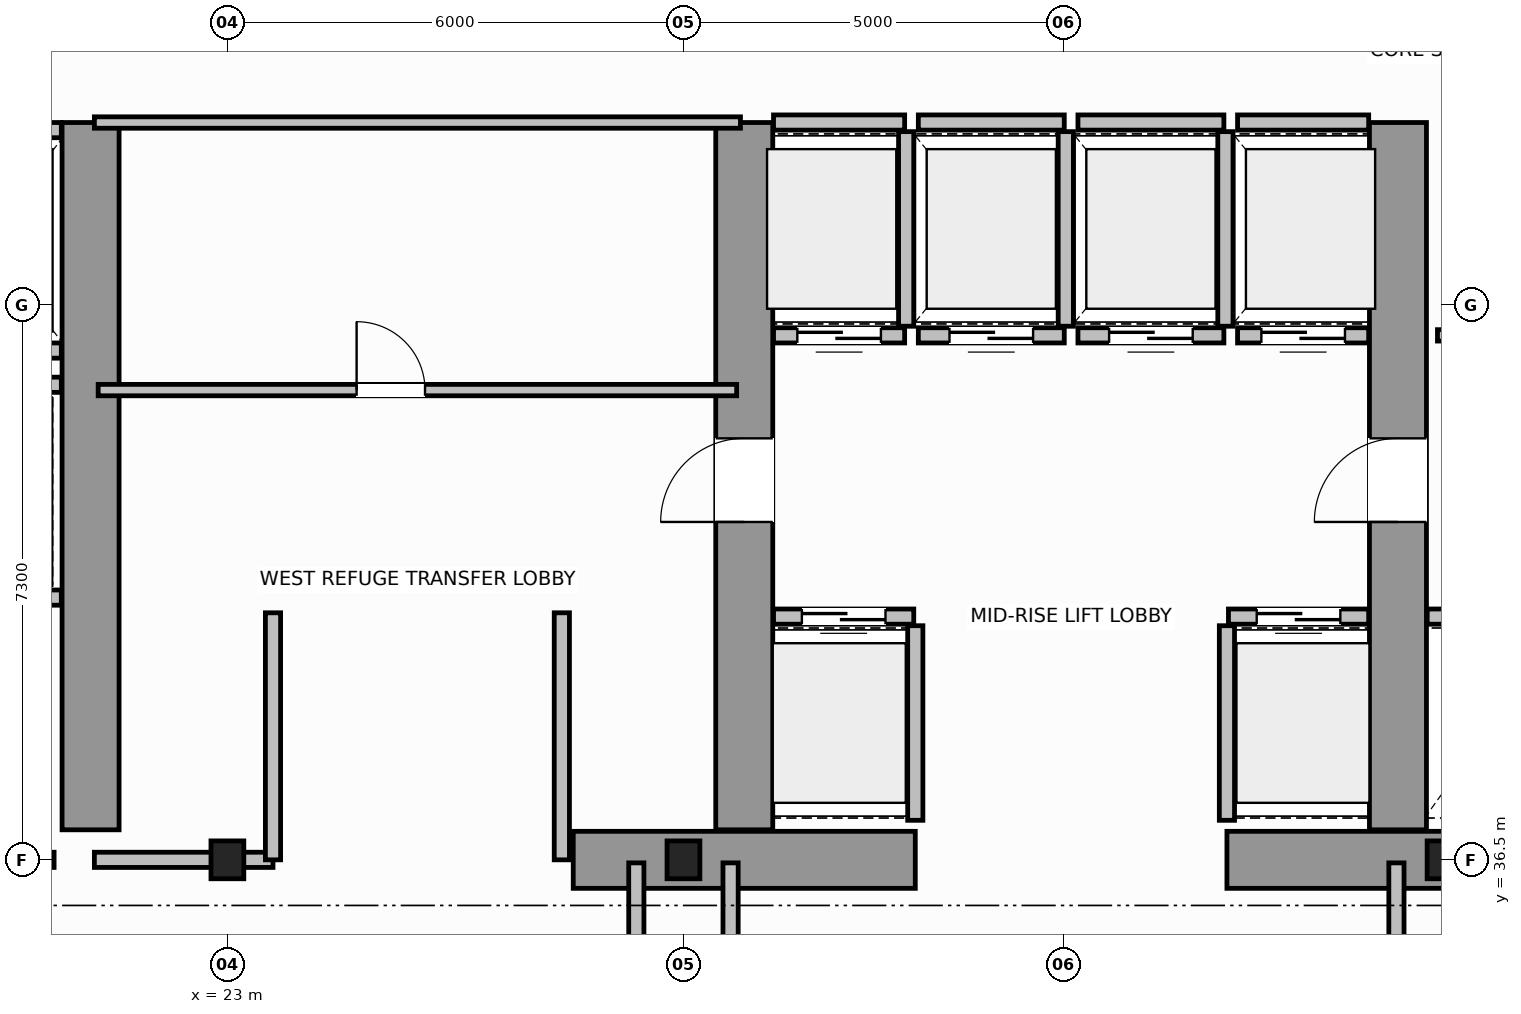
"""IFC4 building model, lengths in metres.
Left out: names, types, materials, properties, quantities, classifications, styles, units other than length and angle.
Written with IfcOpenShell. Run it as: python <this file> out.ifc"""

import sys

from ifc_helpers import new_model, si_unit, direction, frame, frame_2d, origin, origin_2d, place, context, subcontext, project, spatial, rectangle, i_section, extrude, source, transform, mapped, element, fill, save


model = new_model("IFC4")
c1 = context("Model", 3, precision=1e-05, world=origin(), true_north=direction((0.0, 1.0)))
c2 = subcontext(c1, "Body", "Model", "MODEL_VIEW")
j1 = project(units=[si_unit("LENGTHUNIT", "METRE"), si_unit("PLANEANGLEUNIT", "RADIAN")], contexts=[c1])
p1 = place(None, origin())
s1 = spatial("IfcSite", under=j1, at=p1, CompositionType="ELEMENT")
p2 = place(p1, origin())
s2 = spatial("IfcBuilding", under=s1, at=p2, CompositionType="ELEMENT")
p3 = place(p2, frame((0.0, 0.0, 149.0)))
s3 = spatial("IfcBuildingStorey", under=s2, at=p3, CompositionType="ELEMENT", Elevation=149.0)
m1 = source(origin(), c2, "Body", "SweptSolid", [
    extrude(i_section(OverallWidth=0.432, OverallDepth=0.498, WebThickness=0.055, FlangeThickness=0.068, FilletRadius=0.015, at=origin_2d()), origin(), (0.0, 0.0, 1.0), 4.8),
])
for number, where, z_axis, x_axis in (
    (1, (23.0, 36.5, 0.0), (0.0, 0.0, 1.0), (1.0, 0.0, 0.0)),
    (2, (29.0, 36.5, 0.0), (0.0, 0.0, 1.0), (1.0, 0.0, 0.0)),
    (3, (39.0, 36.5, 0.0), (0.0, 0.0, 1.0), (1.0, 0.0, 0.0)),
):
    element("IfcColumn", number, at=place(p3, frame(where, z_axis=z_axis, x_axis=x_axis)), inside=s3, PredefinedType="COLUMN", context=c2, shape_type="MappedRepresentation", body=[
        mapped(m1, transform((0.0, 0.0, 0.0), scale=1.0)),
    ])
for number, where, z_axis, x_axis in (
    (4, (27.55, 36.5, 0.0), (0.0, 0.0, 1.0), (1.0, 0.0, 0.0)),
    (5, (36.15, 36.5, 0.0), (0.0, 0.0, 1.0), (1.0, 0.0, 0.0)),
):
    element("IfcWall", number, at=place(p3, frame(where, z_axis=z_axis, x_axis=x_axis)), inside=s3, PredefinedType="SHEAR", context=c2, shape_type="SweptSolid", body=[
        extrude(rectangle(XDim=4.5, YDim=0.75, at=frame_2d((2.25, 0.0))), origin(), (0.0, 0.0, 1.0), 4.8),
    ])
p4 = place(p3, frame((21.2, 36.895, 0.0), z_axis=(0.0, 0.0, 1.0), x_axis=(0.0, 1.0, 0.0)))
e6 = element("IfcWall", 6, at=p4, inside=s3, PredefinedType="SHEAR", context=c2, shape_type="SweptSolid", body=[
    extrude(rectangle(XDim=9.305, YDim=0.75, at=frame_2d((4.652, 0.0))), origin(), (0.0, 0.0, 1.0), 4.8),
])
p5 = place(p3, frame((29.8, 36.895, 0.0), z_axis=(0.0, 0.0, 1.0), x_axis=(0.0, 1.0, 0.0)))
e7 = element("IfcWall", 7, at=p5, inside=s3, PredefinedType="SHEAR", context=c2, shape_type="SweptSolid", body=[
    extrude(rectangle(XDim=9.305, YDim=0.75, at=frame_2d((4.652, 0.0))), origin(), (0.0, 0.0, 1.0), 4.8),
])
p6 = place(p5, frame((4.05, 0.0, 0.0)))
e8 = element("IfcOpeningElement", 8, at=p6, cuts=e7, PredefinedType="OPENING", context=c2, shape_type="SweptSolid", body=[
    extrude(rectangle(XDim=1.1, YDim=2.15, at=frame_2d((0.55, 1.075))), frame((0.0, 0.385, 0.0), z_axis=(0.0, -1.0, 0.0), x_axis=(1.0, 0.0, 0.0)), (0.0, 0.0, 1.0), 0.77),
])
p7 = place(p3, frame((38.4, 36.895, 0.0), z_axis=(0.0, 0.0, 1.0), x_axis=(0.0, 1.0, 0.0)))
e9 = element("IfcWall", 9, at=p7, inside=s3, PredefinedType="SHEAR", context=c2, shape_type="SweptSolid", body=[
    extrude(rectangle(XDim=9.305, YDim=0.75, at=frame_2d((4.652, 0.0))), origin(), (0.0, 0.0, 1.0), 4.8),
])
p8 = place(p7, frame((4.05, 0.0, 0.0)))
e10 = element("IfcOpeningElement", 10, at=p8, cuts=e9, PredefinedType="OPENING", context=c2, shape_type="SweptSolid", body=[
    extrude(rectangle(XDim=1.1, YDim=2.15, at=frame_2d((0.55, 1.075))), frame((0.0, 0.385, 0.0), z_axis=(0.0, -1.0, 0.0), x_axis=(1.0, 0.0, 0.0)), (0.0, 0.0, 1.0), 0.77),
])
p9 = place(p3, frame((18.25, 36.5, 0.0), z_axis=(0.0, 0.0, 1.0), x_axis=(1.0, 0.0, 0.0)))
e11 = element("IfcWall", 11, at=p9, inside=s3, PredefinedType="SOLIDWALL", context=c2, shape_type="SweptSolid", body=[
    extrude(rectangle(XDim=2.47, YDim=0.2, at=frame_2d((1.235, 0.0))), origin(), (0.0, 0.0, 1.0), 3.33),
])
p10 = place(p9, frame((0.65, 0.0, 0.0)))
e12 = element("IfcOpeningElement", 12, at=p10, cuts=e11, PredefinedType="OPENING", context=c2, shape_type="SweptSolid", body=[
    extrude(rectangle(XDim=1.1, YDim=2.15, at=frame_2d((0.55, 1.075))), frame((0.0, 0.11, 0.0), z_axis=(0.0, -1.0, 0.0), x_axis=(1.0, 0.0, 0.0)), (0.0, 0.0, 1.0), 0.22),
])
p11 = place(p3, frame((30.185, 39.7, 0.0), z_axis=(0.0, 0.0, 1.0), x_axis=(1.0, 0.0, 0.0)))
e13 = element("IfcWall", 13, at=p11, inside=s3, PredefinedType="SOLIDWALL", context=c2, shape_type="SweptSolid", body=[
    extrude(rectangle(XDim=1.845, YDim=0.2, at=frame_2d((0.922, 0.0))), origin(), (0.0, 0.0, 1.0), 4.54),
])
p12 = place(p11, frame((0.373, 0.0, 0.0)))
e14 = element("IfcOpeningElement", 14, at=p12, cuts=e13, PredefinedType="OPENING", context=c2, shape_type="SweptSolid", body=[
    extrude(rectangle(XDim=1.1, YDim=2.15, at=frame_2d((0.55, 1.075))), frame((0.0, 0.11, 0.0), z_axis=(0.0, -1.0, 0.0), x_axis=(1.0, 0.0, 0.0)), (0.0, 0.0, 1.0), 0.22),
])
p13 = place(p3, frame((32.05, 37.02, 0.0), z_axis=(0.0, 0.0, 1.0), x_axis=(0.0, 1.0, 0.0)))
e15 = element("IfcWall", 15, at=p13, inside=s3, PredefinedType="SOLIDWALL", context=c2, shape_type="SweptSolid", body=[
    extrude(rectangle(XDim=2.56, YDim=0.2, at=frame_2d((1.28, 0.0))), origin(), (0.0, 0.0, 1.0), 4.54),
])
p14 = place(p3, frame((36.17, 39.7, 0.0), z_axis=(0.0, 0.0, 1.0), x_axis=(1.0, 0.0, 0.0)))
e16 = element("IfcWall", 16, at=p14, inside=s3, PredefinedType="SOLIDWALL", context=c2, shape_type="SweptSolid", body=[
    extrude(rectangle(XDim=1.845, YDim=0.2, at=frame_2d((0.922, 0.0))), origin(), (0.0, 0.0, 1.0), 4.54),
])
p15 = place(p14, frame((0.372, 0.0, 0.0)))
e17 = element("IfcOpeningElement", 17, at=p15, cuts=e16, PredefinedType="OPENING", context=c2, shape_type="SweptSolid", body=[
    extrude(rectangle(XDim=1.1, YDim=2.15, at=frame_2d((0.55, 1.075))), frame((0.0, 0.11, 0.0), z_axis=(0.0, -1.0, 0.0), x_axis=(1.0, 0.0, 0.0)), (0.0, 0.0, 1.0), 0.22),
])
p16 = place(p3, frame((36.15, 37.02, 0.0), z_axis=(0.0, 0.0, 1.0), x_axis=(0.0, 1.0, 0.0)))
e18 = element("IfcWall", 18, at=p16, inside=s3, PredefinedType="SOLIDWALL", context=c2, shape_type="SweptSolid", body=[
    extrude(rectangle(XDim=2.56, YDim=0.2, at=frame_2d((1.28, 0.0))), origin(), (0.0, 0.0, 1.0), 4.54),
])
p17 = place(p3, frame((30.185, 43.4, 0.0), z_axis=(0.0, 0.0, 1.0), x_axis=(1.0, 0.0, 0.0)))
e19 = element("IfcWall", 19, at=p17, inside=s3, PredefinedType="SOLIDWALL", context=c2, shape_type="SweptSolid", body=[
    extrude(rectangle(XDim=1.725, YDim=0.2, at=frame_2d((0.862, 0.0))), origin(), (0.0, 0.0, 1.0), 4.54),
])
p18 = place(p17, frame((0.313, 0.0, 0.0)))
e20 = element("IfcOpeningElement", 20, at=p18, cuts=e19, PredefinedType="OPENING", context=c2, shape_type="SweptSolid", body=[
    extrude(rectangle(XDim=1.1, YDim=2.15, at=frame_2d((0.55, 1.075))), frame((0.0, 0.11, 0.0), z_axis=(0.0, -1.0, 0.0), x_axis=(1.0, 0.0, 0.0)), (0.0, 0.0, 1.0), 0.22),
])
p19 = place(p3, frame((30.185, 46.2, 0.0), z_axis=(0.0, 0.0, 1.0), x_axis=(1.0, 0.0, 0.0)))
e21 = element("IfcWall", 21, at=p19, inside=s3, PredefinedType="SOLIDWALL", context=c2, shape_type="SweptSolid", body=[
    extrude(rectangle(XDim=1.725, YDim=0.2, at=frame_2d((0.862, 0.0))), origin(), (0.0, 0.0, 1.0), 4.54),
])
p20 = place(p3, frame((31.93, 43.52, 0.0), z_axis=(0.0, 0.0, 1.0), x_axis=(0.0, 1.0, 0.0)))
e22 = element("IfcWall", 22, at=p20, inside=s3, PredefinedType="SOLIDWALL", context=c2, shape_type="SweptSolid", body=[
    extrude(rectangle(XDim=2.56, YDim=0.2, at=frame_2d((1.28, 0.0))), origin(), (0.0, 0.0, 1.0), 4.54),
])
p21 = place(p3, frame((32.09, 43.4, 0.0), z_axis=(0.0, 0.0, 1.0), x_axis=(1.0, 0.0, 0.0)))
e23 = element("IfcWall", 23, at=p21, inside=s3, PredefinedType="SOLIDWALL", context=c2, shape_type="SweptSolid", body=[
    extrude(rectangle(XDim=1.92, YDim=0.2, at=frame_2d((0.96, 0.0))), origin(), (0.0, 0.0, 1.0), 4.54),
])
p22 = place(p21, frame((0.41, 0.0, 0.0)))
e24 = element("IfcOpeningElement", 24, at=p22, cuts=e23, PredefinedType="OPENING", context=c2, shape_type="SweptSolid", body=[
    extrude(rectangle(XDim=1.1, YDim=2.15, at=frame_2d((0.55, 1.075))), frame((0.0, 0.11, 0.0), z_axis=(0.0, -1.0, 0.0), x_axis=(1.0, 0.0, 0.0)), (0.0, 0.0, 1.0), 0.22),
])
p23 = place(p3, frame((32.09, 46.2, 0.0), z_axis=(0.0, 0.0, 1.0), x_axis=(1.0, 0.0, 0.0)))
e25 = element("IfcWall", 25, at=p23, inside=s3, PredefinedType="SOLIDWALL", context=c2, shape_type="SweptSolid", body=[
    extrude(rectangle(XDim=1.92, YDim=0.2, at=frame_2d((0.96, 0.0))), origin(), (0.0, 0.0, 1.0), 4.54),
])
p24 = place(p3, frame((34.03, 43.52, 0.0), z_axis=(0.0, 0.0, 1.0), x_axis=(0.0, 1.0, 0.0)))
e26 = element("IfcWall", 26, at=p24, inside=s3, PredefinedType="SOLIDWALL", context=c2, shape_type="SweptSolid", body=[
    extrude(rectangle(XDim=2.56, YDim=0.2, at=frame_2d((1.28, 0.0))), origin(), (0.0, 0.0, 1.0), 4.54),
])
p25 = place(p3, frame((34.19, 43.4, 0.0), z_axis=(0.0, 0.0, 1.0), x_axis=(1.0, 0.0, 0.0)))
e27 = element("IfcWall", 27, at=p25, inside=s3, PredefinedType="SOLIDWALL", context=c2, shape_type="SweptSolid", body=[
    extrude(rectangle(XDim=1.92, YDim=0.2, at=frame_2d((0.96, 0.0))), origin(), (0.0, 0.0, 1.0), 4.54),
])
p26 = place(p25, frame((0.41, 0.0, 0.0)))
e28 = element("IfcOpeningElement", 28, at=p26, cuts=e27, PredefinedType="OPENING", context=c2, shape_type="SweptSolid", body=[
    extrude(rectangle(XDim=1.1, YDim=2.15, at=frame_2d((0.55, 1.075))), frame((0.0, 0.11, 0.0), z_axis=(0.0, -1.0, 0.0), x_axis=(1.0, 0.0, 0.0)), (0.0, 0.0, 1.0), 0.22),
])
p27 = place(p3, frame((34.19, 46.2, 0.0), z_axis=(0.0, 0.0, 1.0), x_axis=(1.0, 0.0, 0.0)))
e29 = element("IfcWall", 29, at=p27, inside=s3, PredefinedType="SOLIDWALL", context=c2, shape_type="SweptSolid", body=[
    extrude(rectangle(XDim=1.92, YDim=0.2, at=frame_2d((0.96, 0.0))), origin(), (0.0, 0.0, 1.0), 4.54),
])
p28 = place(p3, frame((36.13, 43.52, 0.0), z_axis=(0.0, 0.0, 1.0), x_axis=(0.0, 1.0, 0.0)))
e30 = element("IfcWall", 30, at=p28, inside=s3, PredefinedType="SOLIDWALL", context=c2, shape_type="SweptSolid", body=[
    extrude(rectangle(XDim=2.56, YDim=0.2, at=frame_2d((1.28, 0.0))), origin(), (0.0, 0.0, 1.0), 4.54),
])
p29 = place(p3, frame((36.29, 43.4, 0.0), z_axis=(0.0, 0.0, 1.0), x_axis=(1.0, 0.0, 0.0)))
e31 = element("IfcWall", 31, at=p29, inside=s3, PredefinedType="SOLIDWALL", context=c2, shape_type="SweptSolid", body=[
    extrude(rectangle(XDim=1.725, YDim=0.2, at=frame_2d((0.862, 0.0))), origin(), (0.0, 0.0, 1.0), 4.54),
])
p30 = place(p29, frame((0.313, 0.0, 0.0)))
e32 = element("IfcOpeningElement", 32, at=p30, cuts=e31, PredefinedType="OPENING", context=c2, shape_type="SweptSolid", body=[
    extrude(rectangle(XDim=1.1, YDim=2.15, at=frame_2d((0.55, 1.075))), frame((0.0, 0.11, 0.0), z_axis=(0.0, -1.0, 0.0), x_axis=(1.0, 0.0, 0.0)), (0.0, 0.0, 1.0), 0.22),
])
p31 = place(p3, frame((36.29, 46.2, 0.0), z_axis=(0.0, 0.0, 1.0), x_axis=(1.0, 0.0, 0.0)))
e33 = element("IfcWall", 33, at=p31, inside=s3, PredefinedType="SOLIDWALL", context=c2, shape_type="SweptSolid", body=[
    extrude(rectangle(XDim=1.725, YDim=0.2, at=frame_2d((0.862, 0.0))), origin(), (0.0, 0.0, 1.0), 4.54),
])
p32 = place(p3, frame((38.785, 39.7, 0.0), z_axis=(0.0, 0.0, 1.0), x_axis=(1.0, 0.0, 0.0)))
e34 = element("IfcWall", 34, at=p32, inside=s3, PredefinedType="SOLIDWALL", context=c2, shape_type="SweptSolid", body=[
    extrude(rectangle(XDim=1.845, YDim=0.2, at=frame_2d((0.922, 0.0))), origin(), (0.0, 0.0, 1.0), 4.54),
])
p33 = place(p3, frame((18.67, 46.1, 0.0), z_axis=(0.0, 0.0, 1.0), x_axis=(1.0, 0.0, 0.0)))
e35 = element("IfcWall", 35, at=p33, inside=s3, PredefinedType="SOLIDWALL", context=c2, shape_type="SweptSolid", body=[
    extrude(rectangle(XDim=2.145, YDim=0.2, at=frame_2d((1.073, 0.0))), origin(), (0.0, 0.0, 1.0), 4.54),
])
p34 = place(p33, frame((0.522, 0.0, 0.0)))
e36 = element("IfcOpeningElement", 36, at=p34, cuts=e35, PredefinedType="OPENING", context=c2, shape_type="SweptSolid", body=[
    extrude(rectangle(XDim=1.1, YDim=2.15, at=frame_2d((0.55, 1.075))), frame((0.0, 0.11, 0.0), z_axis=(0.0, -1.0, 0.0), x_axis=(1.0, 0.0, 0.0)), (0.0, 0.0, 1.0), 0.22),
])
p35 = place(p3, frame((18.67, 43.2, 0.0), z_axis=(0.0, 0.0, 1.0), x_axis=(1.0, 0.0, 0.0)))
e37 = element("IfcWall", 37, at=p35, inside=s3, PredefinedType="SOLIDWALL", context=c2, shape_type="SweptSolid", body=[
    extrude(rectangle(XDim=2.145, YDim=0.2, at=frame_2d((1.073, 0.0))), origin(), (0.0, 0.0, 1.0), 4.54),
])
p36 = place(p3, frame((18.67, 39.95, 0.0), z_axis=(0.0, 0.0, 1.0), x_axis=(1.0, 0.0, 0.0)))
e38 = element("IfcWall", 38, at=p36, inside=s3, PredefinedType="SOLIDWALL", context=c2, shape_type="SweptSolid", body=[
    extrude(rectangle(XDim=2.145, YDim=0.2, at=frame_2d((1.073, 0.0))), origin(), (0.0, 0.0, 1.0), 4.54),
])
p37 = place(p36, frame((0.522, 0.0, 0.0)))
e39 = element("IfcOpeningElement", 39, at=p37, cuts=e38, PredefinedType="OPENING", context=c2, shape_type="SweptSolid", body=[
    extrude(rectangle(XDim=1.1, YDim=2.15, at=frame_2d((0.55, 1.075))), frame((0.0, 0.11, 0.0), z_axis=(0.0, -1.0, 0.0), x_axis=(1.0, 0.0, 0.0)), (0.0, 0.0, 1.0), 0.22),
])
p38 = place(p3, frame((18.67, 42.75, 0.0), z_axis=(0.0, 0.0, 1.0), x_axis=(1.0, 0.0, 0.0)))
e40 = element("IfcWall", 40, at=p38, inside=s3, PredefinedType="SOLIDWALL", context=c2, shape_type="SweptSolid", body=[
    extrude(rectangle(XDim=2.145, YDim=0.2, at=frame_2d((1.073, 0.0))), origin(), (0.0, 0.0, 1.0), 4.54),
])
p39 = place(p3, frame((21.25, 36.5, 0.0), z_axis=(0.0, 0.0, 1.0), x_axis=(1.0, 0.0, 0.0)))
e41 = element("IfcWall", 41, at=p39, inside=s3, PredefinedType="SOLIDWALL", context=c2, shape_type="SweptSolid", body=[
    extrude(rectangle(XDim=2.35, YDim=0.2, at=frame_2d((1.175, 0.0))), origin(), (0.0, 0.0, 1.0), 3.33),
])
for number, where, z_axis, x_axis in (
    (42, (23.6, 36.5, 0.0), (0.0, 0.0, 1.0), (0.0, 1.0, 0.0)),
    (43, (27.4, 36.5, 0.0), (0.0, 0.0, 1.0), (0.0, 1.0, 0.0)),
):
    element("IfcWall", number, at=place(p3, frame(where, z_axis=z_axis, x_axis=x_axis)), inside=s3, PredefinedType="SOLIDWALL", context=c2, shape_type="SweptSolid", body=[
        extrude(rectangle(XDim=3.25, YDim=0.2, at=frame_2d((1.625, 0.0))), origin(), (0.0, 0.0, 1.0), 4.54),
    ])
p40 = place(p3, frame((21.25, 46.2, 0.0), z_axis=(0.0, 0.0, 1.0), x_axis=(1.0, 0.0, 0.0)))
e44 = element("IfcWall", 44, at=p40, inside=s3, PredefinedType="PARTITIONING", context=c2, shape_type="SweptSolid", body=[
    extrude(rectangle(XDim=8.5, YDim=0.15, at=frame_2d((4.25, 0.0))), origin(), (0.0, 0.0, 1.0), 4.54),
])
p41 = place(p3, frame((21.3, 42.68, 0.0), z_axis=(0.0, 0.0, 1.0), x_axis=(1.0, 0.0, 0.0)))
e45 = element("IfcWall", 45, at=p41, inside=s3, PredefinedType="PARTITIONING", context=c2, shape_type="SweptSolid", body=[
    extrude(rectangle(XDim=8.4, YDim=0.15, at=frame_2d((4.2, 0.0))), origin(), (0.0, 0.0, 1.0), 4.54),
])
p42 = place(p41, frame((3.4, 0.0, 0.0)))
e46 = element("IfcOpeningElement", 46, at=p42, cuts=e45, PredefinedType="OPENING", context=c2, shape_type="SweptSolid", body=[
    extrude(rectangle(XDim=0.9, YDim=2.1, at=frame_2d((0.45, 1.05))), frame((0.0, 0.085, 0.0), z_axis=(0.0, -1.0, 0.0), x_axis=(1.0, 0.0, 0.0)), (0.0, 0.0, 1.0), 0.17),
])
p43 = place(p3, frame((38.92, 43.4, 0.0), z_axis=(0.0, 0.0, 1.0), x_axis=(1.0, 0.0, 0.0)))
e47 = element("IfcWall", 47, at=p43, inside=s3, PredefinedType="PARTITIONING", context=c2, shape_type="SweptSolid", body=[
    extrude(rectangle(XDim=1.6, YDim=0.15, at=frame_2d((0.8, 0.0))), origin(), (0.0, 0.0, 1.0), 4.54),
])
p44 = place(p43, frame((0.35, 0.0, 0.0)))
e48 = element("IfcOpeningElement", 48, at=p44, cuts=e47, PredefinedType="OPENING", context=c2, shape_type="SweptSolid", body=[
    extrude(rectangle(XDim=0.9, YDim=2.1, at=frame_2d((0.45, 1.05))), frame((0.0, 0.085, 0.0), z_axis=(0.0, -1.0, 0.0), x_axis=(1.0, 0.0, 0.0)), (0.0, 0.0, 1.0), 0.17),
])
for number, where, z_axis, x_axis in (
    (49, (28.38, 28.16, 0.0), (0.0, 0.0, 1.0), (0.0, 1.0, 0.0)),
    (50, (29.62, 28.16, 0.0), (0.0, 0.0, 1.0), (0.0, 1.0, 0.0)),
    (51, (38.38, 28.16, 0.0), (0.0, 0.0, 1.0), (0.0, 1.0, 0.0)),
):
    element("IfcWall", number, at=place(p3, frame(where, z_axis=z_axis, x_axis=x_axis)), inside=s3, PredefinedType="SOLIDWALL", context=c2, shape_type="SweptSolid", body=[
        extrude(rectangle(XDim=8.3, YDim=0.2, at=frame_2d((4.15, 0.0))), origin(), (0.0, 0.0, 1.0), 4.54),
    ])
m2 = source(origin(), c2, "Body", "SweptSolid", [
    extrude(rectangle(XDim=1.1, YDim=2.15, at=frame_2d((0.55, 1.075))), frame((0.0, 0.025, 0.0), z_axis=(0.0, -1.0, 0.0), x_axis=(1.0, 0.0, 0.0)), (0.0, 0.0, 1.0), 0.05),
])
p45 = place(p12, origin())
e52 = element("IfcDoor", 52, at=p45, inside=s3, OperationType="DOUBLE_DOOR_SLIDING", PredefinedType="DOOR", context=c2, shape_type="MappedRepresentation", body=[
    mapped(m2, transform((0.0, 0.0, 0.0), scale=1.0)),
])
fill(e14, e52)
p46 = place(p15, origin())
e53 = element("IfcDoor", 53, at=p46, inside=s3, OperationType="DOUBLE_DOOR_SLIDING", PredefinedType="DOOR", context=c2, shape_type="MappedRepresentation", body=[
    mapped(m2, transform((0.0, 0.0, 0.0), scale=1.0)),
])
fill(e17, e53)
p47 = place(p18, origin())
e54 = element("IfcDoor", 54, at=p47, inside=s3, OperationType="DOUBLE_DOOR_SLIDING", PredefinedType="DOOR", context=c2, shape_type="MappedRepresentation", body=[
    mapped(m2, transform((0.0, 0.0, 0.0), scale=1.0)),
])
fill(e20, e54)
p48 = place(p22, origin())
e55 = element("IfcDoor", 55, at=p48, inside=s3, OperationType="DOUBLE_DOOR_SLIDING", PredefinedType="DOOR", context=c2, shape_type="MappedRepresentation", body=[
    mapped(m2, transform((0.0, 0.0, 0.0), scale=1.0)),
])
fill(e24, e55)
p49 = place(p26, origin())
e56 = element("IfcDoor", 56, at=p49, inside=s3, OperationType="DOUBLE_DOOR_SLIDING", PredefinedType="DOOR", context=c2, shape_type="MappedRepresentation", body=[
    mapped(m2, transform((0.0, 0.0, 0.0), scale=1.0)),
])
fill(e28, e56)
p50 = place(p30, origin())
e57 = element("IfcDoor", 57, at=p50, inside=s3, OperationType="DOUBLE_DOOR_SLIDING", PredefinedType="DOOR", context=c2, shape_type="MappedRepresentation", body=[
    mapped(m2, transform((0.0, 0.0, 0.0), scale=1.0)),
])
fill(e32, e57)
m3 = source(origin(), c2, "Body", "SweptSolid", [
    extrude(rectangle(XDim=0.9, YDim=2.1, at=frame_2d((0.45, 1.05))), frame((0.0, 0.025, 0.0), z_axis=(0.0, -1.0, 0.0), x_axis=(1.0, 0.0, 0.0)), (0.0, 0.0, 1.0), 0.05),
])
p51 = place(p42, origin())
e58 = element("IfcDoor", 58, at=p51, inside=s3, OperationType="SINGLE_SWING_RIGHT", PredefinedType="DOOR", context=c2, shape_type="MappedRepresentation", body=[
    mapped(m3, transform((0.0, 0.0, 0.0), scale=1.0)),
])
fill(e46, e58)
p52 = place(p6, origin())
e59 = element("IfcDoor", 59, at=p52, inside=s3, OperationType="SINGLE_SWING_LEFT", PredefinedType="DOOR", context=c2, shape_type="MappedRepresentation", body=[
    mapped(m2, transform((0.0, 0.0, 0.0), scale=1.0)),
])
fill(e8, e59)
p53 = place(p8, origin())
e60 = element("IfcDoor", 60, at=p53, inside=s3, OperationType="SINGLE_SWING_RIGHT", PredefinedType="DOOR", context=c2, shape_type="MappedRepresentation", body=[
    mapped(m2, transform((0.0, 0.0, 0.0), scale=1.0)),
])
fill(e10, e60)
save(model, sys.argv[1])
